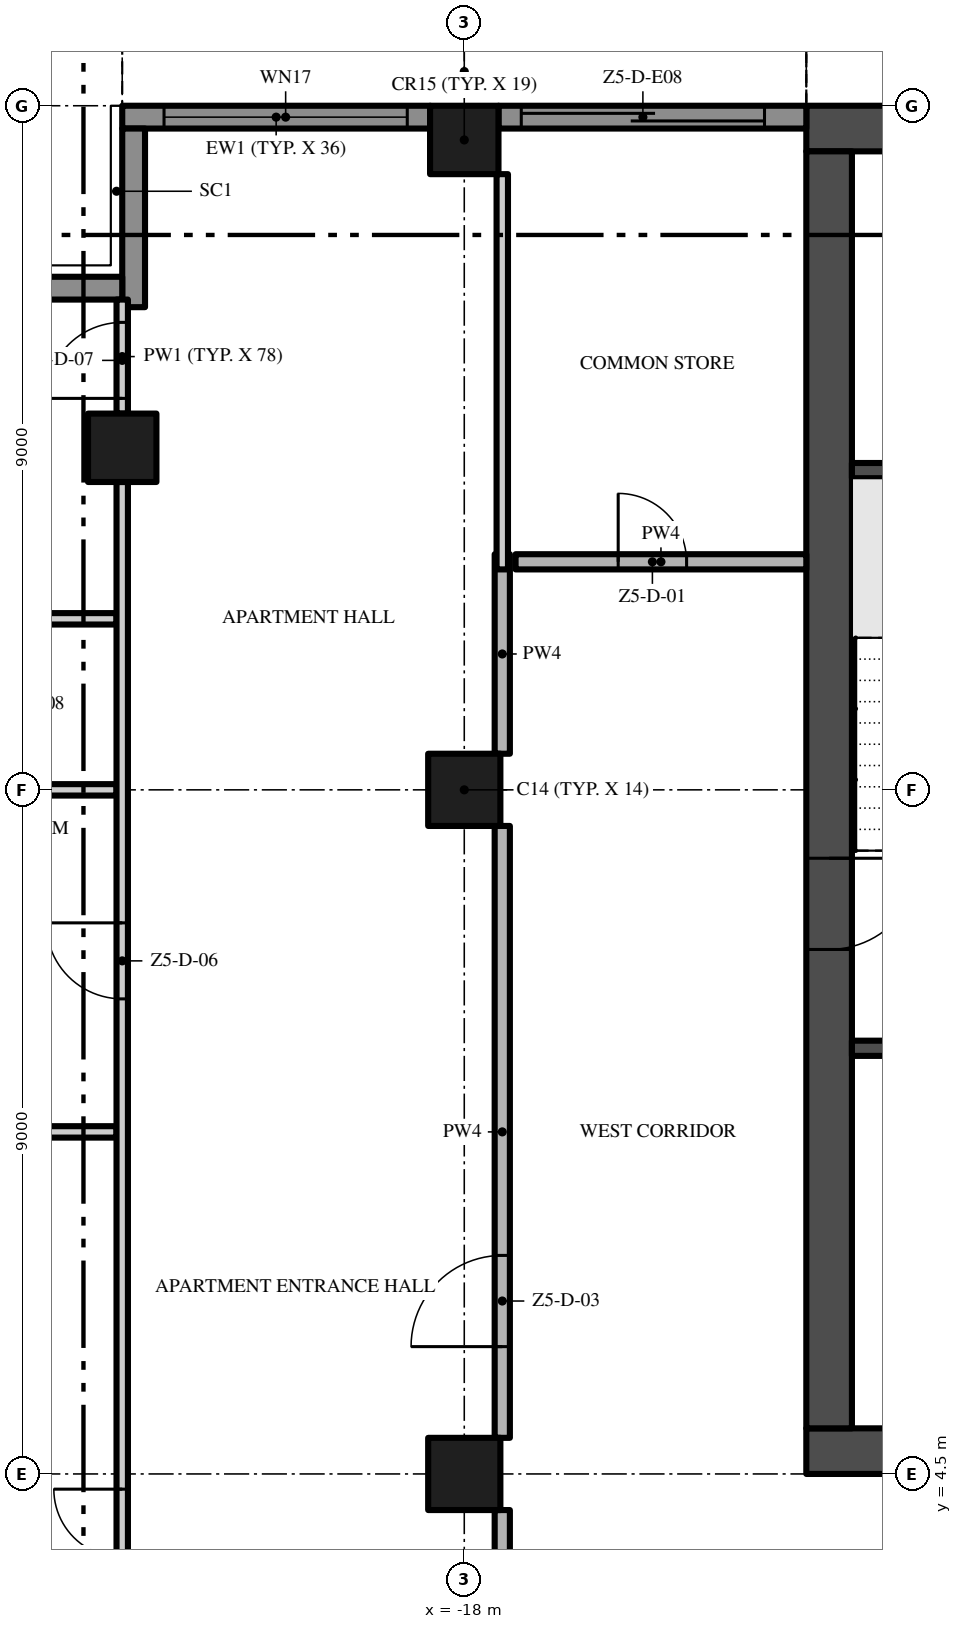
"""IFC4 building model, lengths in metres.
Left out: names, types, materials, properties, quantities, classifications, styles, units other than length and angle.
Written with IfcOpenShell. Run it as: python <this file> out.ifc"""

import sys

from ifc_helpers import new_model, si_unit, direction, frame, frame_2d, origin, origin_2d, place, context, subcontext, project, spatial, rectangle, extrude, element, fill, save


model = new_model("IFC4")
c1 = context("Model", 3, precision=1e-05, world=origin(), true_north=direction((0.0, 1.0)))
c2 = subcontext(c1, "Body", "Model", "MODEL_VIEW")
j1 = project(units=[si_unit("LENGTHUNIT", "METRE"), si_unit("PLANEANGLEUNIT", "RADIAN")], contexts=[c1])
p1 = place(None, origin())
s1 = spatial("IfcSite", under=j1, at=p1, CompositionType="ELEMENT")
p2 = place(p1, origin())
s2 = spatial("IfcBuilding", under=s1, at=p2, CompositionType="ELEMENT")
p3 = place(p2, frame((0.0, 0.0, 273.0)))
s3 = spatial("IfcBuildingStorey", under=s2, at=p3, CompositionType="ELEMENT", Elevation=273.0)
p4 = place(p3, frame((-13.5, 4.8, -0.3), z_axis=(0.0, 0.0, 1.0), x_axis=(1.0, 0.0, 0.0)))
e1 = element("IfcWall", 1, at=p4, inside=s3, PredefinedType="SHEAR", context=c2, shape_type="SweptSolid", body=[
    extrude(rectangle(XDim=27.0, YDim=0.6, at=frame_2d((13.5, 0.0))), origin(), (0.0, 0.0, 1.0), 3.8),
])
p5 = place(p4, frame((12.0, 0.0, 0.3)))
e2 = element("IfcOpeningElement", 2, at=p5, cuts=e1, PredefinedType="OPENING", context=c2, shape_type="SweptSolid", body=[
    extrude(rectangle(XDim=3.0, YDim=2.4, at=frame_2d((1.5, 1.2))), frame((0.0, 0.31, 0.0), z_axis=(0.0, -1.0, 0.0), x_axis=(1.0, 0.0, 0.0)), (0.0, 0.0, 1.0), 0.62),
])
p6 = place(p4, frame((4.9, 0.0, 0.3)))
e3 = element("IfcOpeningElement", 3, at=p6, cuts=e1, PredefinedType="OPENING", context=c2, shape_type="SweptSolid", body=[
    extrude(rectangle(XDim=1.2, YDim=2.2, at=frame_2d((0.6, 1.1))), frame((0.0, 0.31, 0.0), z_axis=(0.0, -1.0, 0.0), x_axis=(1.0, 0.0, 0.0)), (0.0, 0.0, 1.0), 0.62),
])
p7 = place(p4, frame((20.75, 0.0, 0.3)))
e4 = element("IfcOpeningElement", 4, at=p7, cuts=e1, PredefinedType="OPENING", context=c2, shape_type="SweptSolid", body=[
    extrude(rectangle(XDim=1.5, YDim=2.2, at=frame_2d((0.75, 1.1))), frame((0.0, 0.31, 0.0), z_axis=(0.0, -1.0, 0.0), x_axis=(1.0, 0.0, 0.0)), (0.0, 0.0, 1.0), 0.62),
])
p8 = place(p4, frame((17.4, 0.0, 0.3)))
e5 = element("IfcOpeningElement", 5, at=p8, cuts=e1, PredefinedType="OPENING", context=c2, shape_type="SweptSolid", body=[
    extrude(rectangle(XDim=1.2, YDim=2.2, at=frame_2d((0.6, 1.1))), frame((0.0, 0.31, 0.0), z_axis=(0.0, -1.0, 0.0), x_axis=(1.0, 0.0, 0.0)), (0.0, 0.0, 1.0), 0.62),
])
p9 = place(p3, frame((13.5, 22.2, -0.3), z_axis=(0.0, 0.0, 1.0), x_axis=(-1.0, 0.0, 0.0)))
e6 = element("IfcWall", 6, at=p9, inside=s3, PredefinedType="SHEAR", context=c2, shape_type="SweptSolid", body=[
    extrude(rectangle(XDim=27.0, YDim=0.6, at=frame_2d((13.5, 0.0))), origin(), (0.0, 0.0, 1.0), 3.8),
])
p10 = place(p3, frame((-13.2, 21.9, -0.3), z_axis=(0.0, 0.0, 1.0), x_axis=(0.0, -1.0, 0.0)))
e7 = element("IfcWall", 7, at=p10, inside=s3, PredefinedType="SHEAR", context=c2, shape_type="SweptSolid", body=[
    extrude(rectangle(XDim=16.8, YDim=0.6, at=frame_2d((8.4, 0.0))), origin(), (0.0, 0.0, 1.0), 3.8),
])
p11 = place(p10, frame((9.3, 0.0, 0.3)))
e8 = element("IfcOpeningElement", 8, at=p11, cuts=e7, PredefinedType="OPENING", context=c2, shape_type="SweptSolid", body=[
    extrude(rectangle(XDim=1.2, YDim=2.2, at=frame_2d((0.6, 1.1))), frame((0.0, 0.31, 0.0), z_axis=(0.0, -1.0, 0.0), x_axis=(1.0, 0.0, 0.0)), (0.0, 0.0, 1.0), 0.62),
])
p12 = place(p3, frame((-18.0, 13.5, 0.0), z_axis=(0.0, 0.0, 1.0), x_axis=(1.0, 0.0, 0.0)))
e9 = element("IfcColumn", 9, at=p12, inside=s3, PredefinedType="COLUMN", context=c2, shape_type="SweptSolid", body=[
    extrude(rectangle(XDim=0.95, YDim=0.95, at=origin_2d()), origin(), (0.0, 0.0, 1.0), 3.5),
])
p13 = place(p3, frame((-18.0, 22.05, 0.0), z_axis=(0.0, 0.0, 1.0), x_axis=(1.0, 0.0, 0.0)))
e10 = element("IfcColumn", 10, at=p13, inside=s3, PredefinedType="COLUMN", context=c2, shape_type="SweptSolid", body=[
    extrude(rectangle(XDim=0.9, YDim=0.9, at=origin_2d()), origin(), (0.0, 0.0, 1.0), 3.5),
])
p14 = place(p3, frame((-18.0, 4.5, 0.0), z_axis=(0.0, 0.0, 1.0), x_axis=(1.0, 0.0, 0.0)))
e11 = element("IfcColumn", 11, at=p14, inside=s3, PredefinedType="COLUMN", context=c2, shape_type="SweptSolid", body=[
    extrude(rectangle(XDim=0.95, YDim=0.95, at=origin_2d()), origin(), (0.0, 0.0, 1.0), 3.5),
])
p15 = place(p3, frame((-22.5, 18.0, 0.0), z_axis=(0.0, 0.0, 1.0), x_axis=(1.0, 0.0, 0.0)))
e12 = element("IfcColumn", 12, at=p15, inside=s3, PredefinedType="COLUMN", context=c2, shape_type="SweptSolid", body=[
    extrude(rectangle(XDim=0.9, YDim=0.9, at=origin_2d()), origin(), (0.0, 0.0, 1.0), 3.5),
])
p16 = place(p3, frame((-17.55, 22.35, 0.0), z_axis=(0.0, 0.0, 1.0), x_axis=(1.0, 0.0, 0.0)))
e13 = element("IfcWall", 13, at=p16, inside=s3, PredefinedType="SOLIDWALL", context=c2, shape_type="SweptSolid", body=[
    extrude(rectangle(XDim=4.05, YDim=0.3, at=frame_2d((2.025, 0.0))), origin(), (0.0, 0.0, 1.0), 3.5),
])
p17 = place(p16, frame((0.3, 0.0, 0.0)))
e14 = element("IfcOpeningElement", 14, at=p17, cuts=e13, PredefinedType="OPENING", context=c2, shape_type="SweptSolid", body=[
    extrude(rectangle(XDim=3.2, YDim=2.4, at=frame_2d((1.6, 1.2))), frame((0.0, 0.16, 0.0), z_axis=(0.0, -1.0, 0.0), x_axis=(1.0, 0.0, 0.0)), (0.0, 0.0, 1.0), 0.32),
])
p18 = place(p3, frame((-22.5, 22.35, 0.0), z_axis=(0.0, 0.0, 1.0), x_axis=(1.0, 0.0, 0.0)))
e15 = element("IfcWall", 15, at=p18, inside=s3, PredefinedType="SOLIDWALL", context=c2, shape_type="SweptSolid", body=[
    extrude(rectangle(XDim=4.05, YDim=0.3, at=frame_2d((2.025, 0.0))), origin(), (0.0, 0.0, 1.0), 3.5),
])
p19 = place(p18, frame((0.55, 0.0, 0.45)))
e16 = element("IfcOpeningElement", 16, at=p19, cuts=e15, PredefinedType="OPENING", context=c2, shape_type="SweptSolid", body=[
    extrude(rectangle(XDim=3.2, YDim=2.65, at=frame_2d((1.6, 1.325))), frame((0.0, 0.16, 0.0), z_axis=(0.0, -1.0, 0.0), x_axis=(1.0, 0.0, 0.0)), (0.0, 0.0, 1.0), 0.32),
])
p20 = place(p3, frame((-22.35, 19.85, 0.0), z_axis=(0.0, 0.0, 1.0), x_axis=(0.0, 1.0, 0.0)))
e17 = element("IfcWall", 17, at=p20, inside=s3, PredefinedType="SOLIDWALL", context=c2, shape_type="SweptSolid", body=[
    extrude(rectangle(XDim=2.35, YDim=0.3, at=frame_2d((1.175, 0.0))), origin(), (0.0, 0.0, 1.0), 3.5),
])
p21 = place(p3, frame((-24.75, 20.1, 0.0), z_axis=(0.0, 0.0, 1.0), x_axis=(1.0, 0.0, 0.0)))
e18 = element("IfcWall", 18, at=p21, inside=s3, PredefinedType="SOLIDWALL", context=c2, shape_type="SweptSolid", body=[
    extrude(rectangle(XDim=2.25, YDim=0.3, at=frame_2d((1.125, 0.0))), origin(), (0.0, 0.0, 1.0), 3.5),
])
for number, where, z_axis, x_axis in (
    (19, (-12.9, 10.1, 0.0), (0.0, 0.0, 1.0), (1.0, 0.0, 0.0)),
    (20, (-12.9, 17.7, 0.0), (0.0, 0.0, 1.0), (1.0, 0.0, 0.0)),
):
    element("IfcWall", number, at=place(p3, frame(where, z_axis=z_axis, x_axis=x_axis)), inside=s3, PredefinedType="SHEAR", context=c2, shape_type="SweptSolid", body=[
        extrude(rectangle(XDim=3.25, YDim=0.2, at=frame_2d((1.625, 0.0))), origin(), (0.0, 0.0, 1.0), 3.5),
    ])
p22 = place(p3, frame((-26.7, 9.0, 0.0), z_axis=(0.0, 0.0, 1.0), x_axis=(1.0, 0.0, 0.0)))
e21 = element("IfcWall", 21, at=p22, inside=s3, PredefinedType="PARTITIONING", context=c2, shape_type="SweptSolid", body=[
    extrude(rectangle(XDim=4.125, YDim=0.15, at=frame_2d((2.062, 0.0))), origin(), (0.0, 0.0, 1.0), 3.5),
])
p23 = place(p3, frame((-26.1, 13.5, 0.0), z_axis=(0.0, 0.0, 1.0), x_axis=(1.0, 0.0, 0.0)))
e22 = element("IfcWall", 22, at=p23, inside=s3, PredefinedType="PARTITIONING", context=c2, shape_type="SweptSolid", body=[
    extrude(rectangle(XDim=3.525, YDim=0.15, at=frame_2d((1.762, 0.0))), origin(), (0.0, 0.0, 1.0), 3.5),
])
p24 = place(p3, frame((-24.45, 15.75, 0.0), z_axis=(0.0, 0.0, 1.0), x_axis=(1.0, 0.0, 0.0)))
e23 = element("IfcWall", 23, at=p24, inside=s3, PredefinedType="PARTITIONING", context=c2, shape_type="SweptSolid", body=[
    extrude(rectangle(XDim=1.875, YDim=0.15, at=frame_2d((0.938, 0.0))), origin(), (0.0, 0.0, 1.0), 3.5),
])
p25 = place(p3, frame((-17.325, 16.5, 0.0), z_axis=(0.0, 0.0, 1.0), x_axis=(1.0, 0.0, 0.0)))
e24 = element("IfcWall", 24, at=p25, inside=s3, PredefinedType="PARTITIONING", context=c2, shape_type="SweptSolid", body=[
    extrude(rectangle(XDim=3.825, YDim=0.2, at=frame_2d((1.913, 0.0))), origin(), (0.0, 0.0, 1.0), 3.5),
])
p26 = place(p25, frame((1.35, 0.0, 0.0)))
e25 = element("IfcOpeningElement", 25, at=p26, cuts=e24, PredefinedType="OPENING", context=c2, shape_type="SweptSolid", body=[
    extrude(rectangle(XDim=0.9, YDim=2.1, at=frame_2d((0.45, 1.05))), frame((0.0, 0.11, 0.0), z_axis=(0.0, -1.0, 0.0), x_axis=(1.0, 0.0, 0.0)), (0.0, 0.0, 1.0), 0.22),
])
p27 = place(p3, frame((-22.5, 0.1, 0.0), z_axis=(0.0, 0.0, 1.0), x_axis=(0.0, 1.0, 0.0)))
e26 = element("IfcWall", 26, at=p27, inside=s3, PredefinedType="PARTITIONING", context=c2, shape_type="SweptSolid", body=[
    extrude(rectangle(XDim=17.45, YDim=0.15, at=frame_2d((8.725, 0.0))), origin(), (0.0, 0.0, 1.0), 3.5),
])
p28 = place(p27, frame((2.4, 0.0, 0.0)))
e27 = element("IfcOpeningElement", 27, at=p28, cuts=e26, PredefinedType="OPENING", context=c2, shape_type="SweptSolid", body=[
    extrude(rectangle(XDim=1.8, YDim=2.4, at=frame_2d((0.9, 1.2))), frame((0.0, 0.085, 0.0), z_axis=(0.0, -1.0, 0.0), x_axis=(1.0, 0.0, 0.0)), (0.0, 0.0, 1.0), 0.17),
])
p29 = place(p27, frame((10.65, 0.0, 0.0)))
e28 = element("IfcOpeningElement", 28, at=p29, cuts=e26, PredefinedType="OPENING", context=c2, shape_type="SweptSolid", body=[
    extrude(rectangle(XDim=1.0, YDim=2.4, at=frame_2d((0.5, 1.2))), frame((0.0, 0.085, 0.0), z_axis=(0.0, -1.0, 0.0), x_axis=(1.0, 0.0, 0.0)), (0.0, 0.0, 1.0), 0.17),
])
p30 = place(p3, frame((-22.5, 18.45, 0.0), z_axis=(0.0, 0.0, 1.0), x_axis=(0.0, 1.0, 0.0)))
e29 = element("IfcWall", 29, at=p30, inside=s3, PredefinedType="PARTITIONING", context=c2, shape_type="SweptSolid", body=[
    extrude(rectangle(XDim=1.5, YDim=0.15, at=frame_2d((0.75, 0.0))), origin(), (0.0, 0.0, 1.0), 3.5),
])
p31 = place(p30, frame((0.2, 0.0, 0.0)))
e30 = element("IfcOpeningElement", 30, at=p31, cuts=e29, PredefinedType="OPENING", context=c2, shape_type="SweptSolid", body=[
    extrude(rectangle(XDim=1.0, YDim=2.4, at=frame_2d((0.5, 1.2))), frame((0.0, 0.085, 0.0), z_axis=(0.0, -1.0, 0.0), x_axis=(1.0, 0.0, 0.0)), (0.0, 0.0, 1.0), 0.17),
])
p32 = place(p3, frame((-17.5, -0.2, 0.0), z_axis=(0.0, 0.0, 1.0), x_axis=(0.0, 1.0, 0.0)))
e31 = element("IfcWall", 31, at=p32, inside=s3, PredefinedType="PARTITIONING", context=c2, shape_type="SweptSolid", body=[
    extrude(rectangle(XDim=4.225, YDim=0.2, at=frame_2d((2.112, 0.0))), origin(), (0.0, 0.0, 1.0), 3.5),
])
p33 = place(p3, frame((-17.5, 4.975, 0.0), z_axis=(0.0, 0.0, 1.0), x_axis=(0.0, 1.0, 0.0)))
e32 = element("IfcWall", 32, at=p33, inside=s3, PredefinedType="PARTITIONING", context=c2, shape_type="SweptSolid", body=[
    extrude(rectangle(XDim=8.05, YDim=0.2, at=frame_2d((4.025, 0.0))), origin(), (0.0, 0.0, 1.0), 3.5),
])
p34 = place(p33, frame((1.2, 0.0, 0.0)))
e33 = element("IfcOpeningElement", 33, at=p34, cuts=e32, PredefinedType="OPENING", context=c2, shape_type="SweptSolid", body=[
    extrude(rectangle(XDim=1.2, YDim=2.4, at=frame_2d((0.6, 1.2))), frame((0.0, 0.11, 0.0), z_axis=(0.0, -1.0, 0.0), x_axis=(1.0, 0.0, 0.0)), (0.0, 0.0, 1.0), 0.22),
])
p35 = place(p3, frame((-17.5, 13.975, 0.0), z_axis=(0.0, 0.0, 1.0), x_axis=(0.0, 1.0, 0.0)))
e34 = element("IfcWall", 34, at=p35, inside=s3, PredefinedType="PARTITIONING", context=c2, shape_type="SweptSolid", body=[
    extrude(rectangle(XDim=2.625, YDim=0.2, at=frame_2d((1.312, 0.0))), origin(), (0.0, 0.0, 1.0), 3.5),
])
p36 = place(p3, frame((-17.5, 16.4, 0.0), z_axis=(0.0, 0.0, 1.0), x_axis=(0.0, 1.0, 0.0)))
e35 = element("IfcWall", 35, at=p36, inside=s3, PredefinedType="PARTITIONING", context=c2, shape_type="SweptSolid", body=[
    extrude(rectangle(XDim=5.2, YDim=0.15, at=frame_2d((2.6, 0.0))), origin(), (0.0, 0.0, 1.0), 3.5),
])
p37 = place(p17, origin())
e36 = element("IfcDoor", 36, at=p37, inside=s3, OperationType="SINGLE_SWING_LEFT", PredefinedType="DOOR", context=c2, shape_type="SweptSolid", body=[
    extrude(rectangle(XDim=3.2, YDim=2.4, at=frame_2d((1.6, 1.2))), frame((0.0, 0.025, 0.0), z_axis=(0.0, -1.0, 0.0), x_axis=(1.0, 0.0, 0.0)), (0.0, 0.0, 1.0), 0.05),
])
fill(e14, e36)
p38 = place(p19, origin())
e37 = element("IfcWindow", 37, at=p38, inside=s3, PartitioningType="SINGLE_PANEL", PredefinedType="WINDOW", context=c2, shape_type="SweptSolid", body=[
    extrude(rectangle(XDim=3.2, YDim=2.65, at=frame_2d((1.6, 1.325))), frame((0.0, 0.03, 0.0), z_axis=(0.0, -1.0, 0.0), x_axis=(1.0, 0.0, 0.0)), (0.0, 0.0, 1.0), 0.06),
])
fill(e16, e37)
p39 = place(p11, frame((1.2, 0.0, 0.0), z_axis=(0.0, 0.0, 1.0), x_axis=(-1.0, 0.0, 0.0)))
e38 = element("IfcDoor", 38, at=p39, inside=s3, OperationType="SINGLE_SWING_RIGHT", PredefinedType="DOOR", context=c2, shape_type="SweptSolid", body=[
    extrude(rectangle(XDim=1.2, YDim=2.2, at=frame_2d((0.6, 1.1))), frame((0.0, 0.025, 0.0), z_axis=(0.0, -1.0, 0.0), x_axis=(1.0, 0.0, 0.0)), (0.0, 0.0, 1.0), 0.05),
])
fill(e8, e38)
p40 = place(p26, origin())
e39 = element("IfcDoor", 39, at=p40, inside=s3, OperationType="SINGLE_SWING_LEFT", PredefinedType="DOOR", context=c2, shape_type="SweptSolid", body=[
    extrude(rectangle(XDim=0.9, YDim=2.1, at=frame_2d((0.45, 1.05))), frame((0.0, 0.025, 0.0), z_axis=(0.0, -1.0, 0.0), x_axis=(1.0, 0.0, 0.0)), (0.0, 0.0, 1.0), 0.05),
])
fill(e25, e39)
p41 = place(p34, origin())
e40 = element("IfcDoor", 40, at=p41, inside=s3, OperationType="SINGLE_SWING_LEFT", PredefinedType="DOOR", context=c2, shape_type="SweptSolid", body=[
    extrude(rectangle(XDim=1.2, YDim=2.4, at=frame_2d((0.6, 1.2))), frame((0.0, 0.025, 0.0), z_axis=(0.0, -1.0, 0.0), x_axis=(1.0, 0.0, 0.0)), (0.0, 0.0, 1.0), 0.05),
])
fill(e33, e40)
p42 = place(p28, origin())
e41 = element("IfcDoor", 41, at=p42, inside=s3, OperationType="DOUBLE_DOOR_SINGLE_SWING", PredefinedType="DOOR", context=c2, shape_type="SweptSolid", body=[
    extrude(rectangle(XDim=1.8, YDim=2.4, at=frame_2d((0.9, 1.2))), frame((0.0, 0.025, 0.0), z_axis=(0.0, -1.0, 0.0), x_axis=(1.0, 0.0, 0.0)), (0.0, 0.0, 1.0), 0.05),
])
fill(e27, e41)
p43 = place(p29, origin())
e42 = element("IfcDoor", 42, at=p43, inside=s3, OperationType="SINGLE_SWING_RIGHT", PredefinedType="DOOR", context=c2, shape_type="SweptSolid", body=[
    extrude(rectangle(XDim=1.0, YDim=2.4, at=frame_2d((0.5, 1.2))), frame((0.0, 0.025, 0.0), z_axis=(0.0, -1.0, 0.0), x_axis=(1.0, 0.0, 0.0)), (0.0, 0.0, 1.0), 0.05),
])
fill(e28, e42)
p44 = place(p31, origin())
e43 = element("IfcDoor", 43, at=p44, inside=s3, OperationType="SINGLE_SWING_LEFT", PredefinedType="DOOR", context=c2, shape_type="SweptSolid", body=[
    extrude(rectangle(XDim=1.0, YDim=2.4, at=frame_2d((0.5, 1.2))), frame((0.0, 0.025, 0.0), z_axis=(0.0, -1.0, 0.0), x_axis=(1.0, 0.0, 0.0)), (0.0, 0.0, 1.0), 0.05),
])
fill(e30, e43)
save(model, sys.argv[1])
